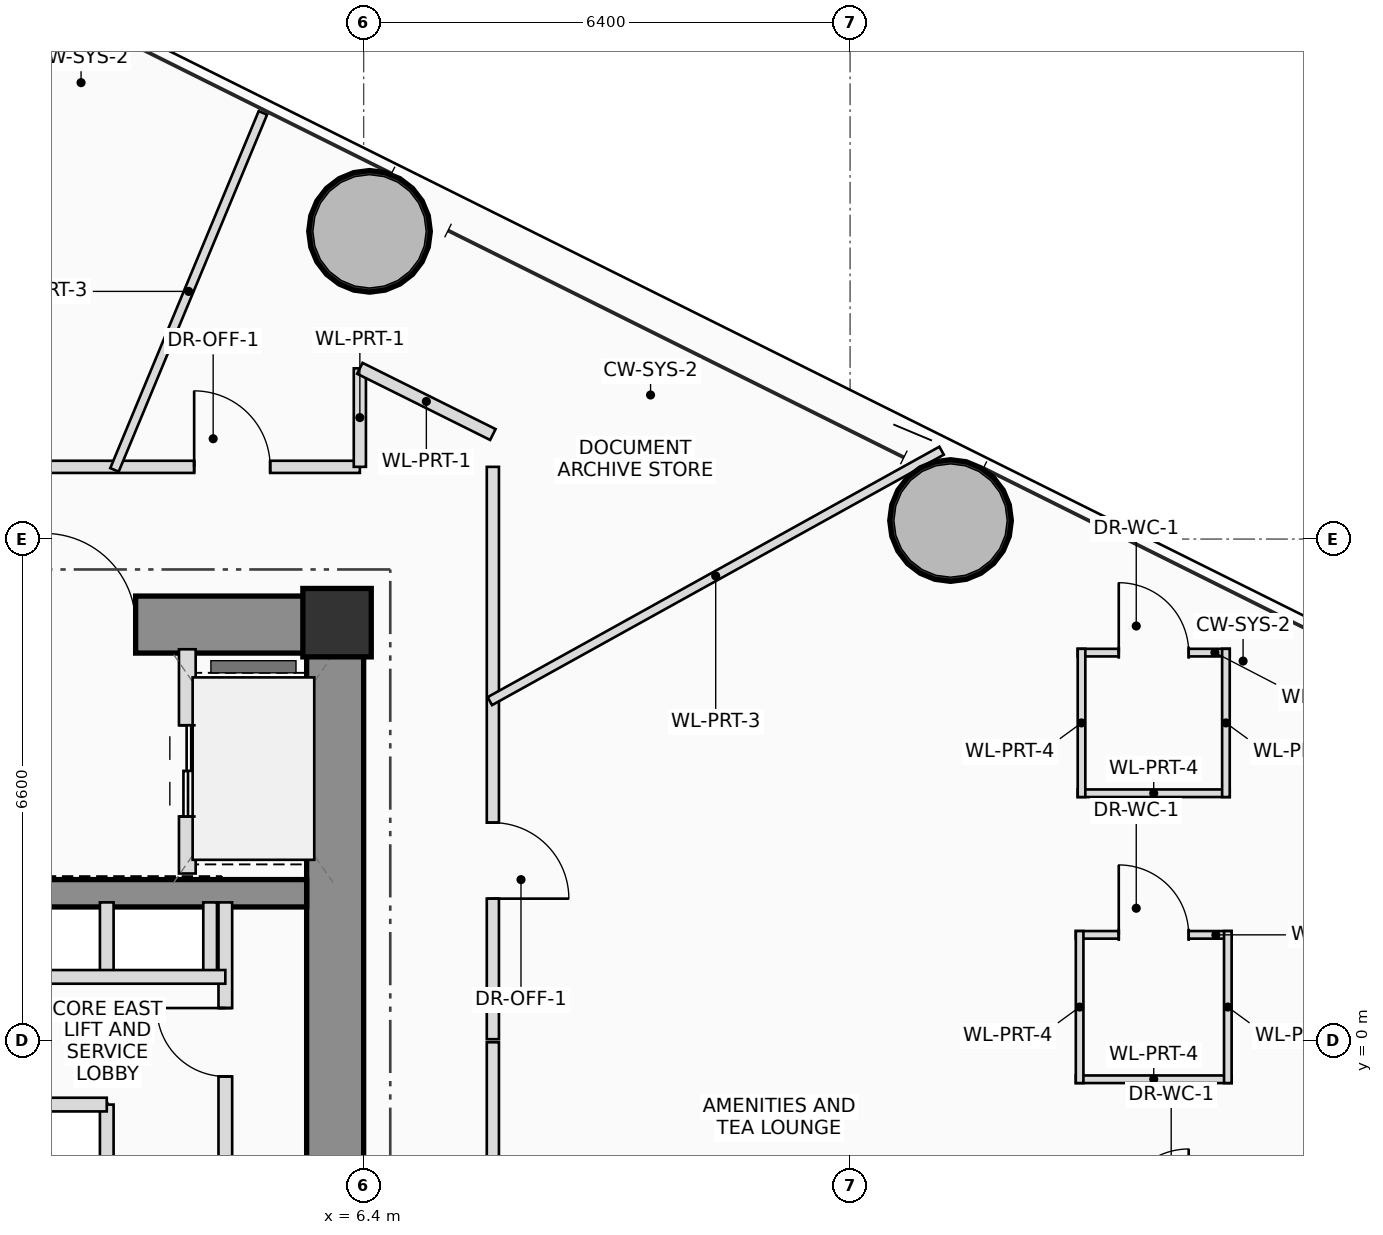
"""IFC4 building model, lengths in metres.
Left out: names, types, materials, properties, quantities, classifications, styles, units other than length and angle.
Written with IfcOpenShell. Run it as: python <this file> out.ifc"""

import sys

from ifc_helpers import new_model, si_unit, direction, frame, frame_2d, origin, origin_2d, place, context, subcontext, project, spatial, rectangle, hollow_circle, extrude, source, transform, mapped, element, fill, save


model = new_model("IFC4")
c1 = context("Model", 3, precision=1e-05, world=origin(), true_north=direction((0.0, 1.0)))
c2 = subcontext(c1, "Body", "Model", "MODEL_VIEW")
j1 = project(units=[si_unit("LENGTHUNIT", "METRE"), si_unit("PLANEANGLEUNIT", "RADIAN")], contexts=[c1])
p1 = place(None, origin())
s1 = spatial("IfcSite", under=j1, at=p1, CompositionType="ELEMENT")
p2 = place(p1, origin())
s2 = spatial("IfcBuilding", under=s1, at=p2, CompositionType="ELEMENT")
p3 = place(p2, frame((0.0, 0.0, 38.6)))
s3 = spatial("IfcBuildingStorey", under=s2, at=p3, CompositionType="ELEMENT", Elevation=38.6)
m1 = source(origin(), c2, "Body", "SweptSolid", [
    extrude(rectangle(XDim=0.9, YDim=0.9, at=origin_2d()), origin(), (0.0, 0.0, 1.0), 3.7),
])
p4 = place(p3, frame((6.05, 5.5, 0.0), z_axis=(0.0, 0.0, 1.0), x_axis=(1.0, 0.0, 0.0)))
e1 = element("IfcColumn", 1, at=p4, inside=s3, PredefinedType="COLUMN", context=c2, shape_type="MappedRepresentation", body=[
    mapped(m1, transform((0.0, 0.0, 0.0), scale=1.0)),
])
p5 = place(p3, frame((-6.4, 5.475, 0.0), z_axis=(0.0, 0.0, 1.0), x_axis=(1.0, 0.0, 0.0)))
e2 = element("IfcWall", 2, at=p5, inside=s3, PredefinedType="SHEAR", context=c2, shape_type="SweptSolid", body=[
    extrude(rectangle(XDim=12.8, YDim=0.75, at=frame_2d((6.4, 0.0))), origin(), (0.0, 0.0, 1.0), 3.7),
])
p6 = place(p5, frame((8.6, 0.0, 0.0)))
e3 = element("IfcOpeningElement", 3, at=p6, cuts=e2, PredefinedType="OPENING", context=c2, shape_type="SweptSolid", body=[
    extrude(rectangle(XDim=1.2, YDim=2.2, at=frame_2d((0.6, 1.1))), frame((0.0, 0.385, 0.0), z_axis=(0.0, -1.0, 0.0), x_axis=(1.0, 0.0, 0.0)), (0.0, 0.0, 1.0), 0.77),
])
p7 = place(p3, frame((6.025, -5.1, 0.0), z_axis=(0.0, 0.0, 1.0), x_axis=(0.0, 1.0, 0.0)))
e4 = element("IfcWall", 4, at=p7, inside=s3, PredefinedType="SHEAR", context=c2, shape_type="SweptSolid", body=[
    extrude(rectangle(XDim=10.2, YDim=0.75, at=frame_2d((5.1, 0.0))), origin(), (0.0, 0.0, 1.0), 3.7),
])
p8 = place(p3, frame((-5.65, 1.94, 0.0), z_axis=(0.0, 0.0, 1.0), x_axis=(1.0, 0.0, 0.0)))
e5 = element("IfcWall", 5, at=p8, inside=s3, PredefinedType="SHEAR", context=c2, shape_type="SweptSolid", body=[
    extrude(rectangle(XDim=11.3, YDim=0.36, at=frame_2d((5.65, 0.0))), origin(), (0.0, 0.0, 1.0), 3.7),
])
m2 = source(origin(), c2, "Body", "SweptSolid", [
    extrude(hollow_circle(Radius=0.8, WallThickness=0.055, at=origin_2d()), origin(), (0.0, 0.0, 1.0), 3.7),
])
for number, where, z_axis, x_axis in (
    (6, (14.122, 6.844, 0.0), (0.0, 0.0, 1.0), (1.0, 0.0, 0.0)),
    (7, (6.477, 10.648, 0.0), (0.0, 0.0, 1.0), (1.0, 0.0, 0.0)),
):
    element("IfcColumn", number, at=place(p3, frame(where, z_axis=z_axis, x_axis=x_axis)), inside=s3, PredefinedType="COLUMN", context=c2, shape_type="MappedRepresentation", body=[
        mapped(m2, transform((0.0, 0.0, 0.0), scale=1.0)),
    ])
p9 = place(p3, frame((4.08, 2.2, 0.0), z_axis=(0.0, 0.0, 1.0), x_axis=(0.0, 1.0, 0.0)))
e8 = element("IfcWall", 8, at=p9, inside=s3, PredefinedType="PLUMBINGWALL", context=c2, shape_type="SweptSolid", body=[
    extrude(rectangle(XDim=2.95, YDim=0.22, at=frame_2d((1.475, 0.0))), origin(), (0.0, 0.0, 1.0), 3.495),
])
p10 = place(p9, frame((0.75, 0.0, 0.0)))
e9 = element("IfcOpeningElement", 9, at=p10, cuts=e8, PredefinedType="OPENING", context=c2, shape_type="SweptSolid", body=[
    extrude(rectangle(XDim=1.2, YDim=2.25, at=frame_2d((0.6, 1.125))), frame((0.0, 0.12, 0.0), z_axis=(0.0, -1.0, 0.0), x_axis=(1.0, 0.0, 0.0)), (0.0, 0.0, 1.0), 0.24),
])
for number, where, z_axis, x_axis in (
    (10, (3.02, 0.84, 0.0), (0.0, 0.0, 1.0), (0.0, 1.0, 0.0)),
    (11, (4.38, 0.84, 0.0), (0.0, 0.0, 1.0), (0.0, 1.0, 0.0)),
    (12, (3.02, -1.82, 0.0), (0.0, 0.0, 1.0), (0.0, 1.0, 0.0)),
):
    element("IfcWall", number, at=place(p3, frame(where, z_axis=z_axis, x_axis=x_axis)), inside=s3, PredefinedType="PLUMBINGWALL", context=c2, shape_type="SweptSolid", body=[
        extrude(rectangle(XDim=0.98, YDim=0.18, at=frame_2d((0.49, 0.0))), origin(), (0.0, 0.0, 1.0), 3.495),
    ])
p11 = place(p3, frame((4.58, -1.82, 0.0), z_axis=(0.0, 0.0, 1.0), x_axis=(0.0, 1.0, 0.0)))
e13 = element("IfcWall", 13, at=p11, inside=s3, PredefinedType="PLUMBINGWALL", context=c2, shape_type="SweptSolid", body=[
    extrude(rectangle(XDim=3.64, YDim=0.18, at=frame_2d((1.82, 0.0))), origin(), (0.0, 0.0, 1.0), 3.495),
])
p12 = place(p11, frame((1.35, 0.0, 0.0)))
e14 = element("IfcOpeningElement", 14, at=p12, cuts=e13, PredefinedType="OPENING", context=c2, shape_type="SweptSolid", body=[
    extrude(rectangle(XDim=0.9, YDim=2.05, at=frame_2d((0.45, 1.025))), frame((0.0, 0.1, 0.0), z_axis=(0.0, -1.0, 0.0), x_axis=(1.0, 0.0, 0.0)), (0.0, 0.0, 1.0), 0.2),
])
p13 = place(p3, frame((-5.68, 0.84, 0.0), z_axis=(0.0, 0.0, 1.0), x_axis=(1.0, 0.0, 0.0)))
e15 = element("IfcWall", 15, at=p13, inside=s3, PredefinedType="PLUMBINGWALL", context=c2, shape_type="SweptSolid", body=[
    extrude(rectangle(XDim=10.26, YDim=0.18, at=frame_2d((5.13, 0.0))), origin(), (0.0, 0.0, 1.0), 3.495),
])
p14 = place(p13, frame((0.43, 0.0, 0.0)))
e16 = element("IfcOpeningElement", 16, at=p14, cuts=e15, PredefinedType="OPENING", context=c2, shape_type="SweptSolid", body=[
    extrude(rectangle(XDim=1.1, YDim=2.2, at=frame_2d((0.55, 1.1))), frame((0.0, 0.1, 0.0), z_axis=(0.0, -1.0, 0.0), x_axis=(1.0, 0.0, 0.0)), (0.0, 0.0, 1.0), 0.2),
])
p15 = place(p13, frame((2.13, 0.0, 0.0)))
e17 = element("IfcOpeningElement", 17, at=p15, cuts=e15, PredefinedType="OPENING", context=c2, shape_type="SweptSolid", body=[
    extrude(rectangle(XDim=1.1, YDim=2.2, at=frame_2d((0.55, 1.1))), frame((0.0, 0.1, 0.0), z_axis=(0.0, -1.0, 0.0), x_axis=(1.0, 0.0, 0.0)), (0.0, 0.0, 1.0), 0.2),
])
p16 = place(p3, frame((-5.68, -0.84, 0.0), z_axis=(0.0, 0.0, 1.0), x_axis=(1.0, 0.0, 0.0)))
e18 = element("IfcWall", 18, at=p16, inside=s3, PredefinedType="PLUMBINGWALL", context=c2, shape_type="SweptSolid", body=[
    extrude(rectangle(XDim=8.7, YDim=0.18, at=frame_2d((4.35, 0.0))), origin(), (0.0, 0.0, 1.0), 3.495),
])
p17 = place(p16, frame((0.43, 0.0, 0.0)))
e19 = element("IfcOpeningElement", 19, at=p17, cuts=e18, PredefinedType="OPENING", context=c2, shape_type="SweptSolid", body=[
    extrude(rectangle(XDim=1.1, YDim=2.2, at=frame_2d((0.55, 1.1))), frame((0.0, 0.1, 0.0), z_axis=(0.0, -1.0, 0.0), x_axis=(1.0, 0.0, 0.0)), (0.0, 0.0, 1.0), 0.2),
])
p18 = place(p16, frame((2.13, 0.0, 0.0)))
e20 = element("IfcOpeningElement", 20, at=p18, cuts=e18, PredefinedType="OPENING", context=c2, shape_type="SweptSolid", body=[
    extrude(rectangle(XDim=1.1, YDim=2.2, at=frame_2d((0.55, 1.1))), frame((0.0, 0.1, 0.0), z_axis=(0.0, -1.0, 0.0), x_axis=(1.0, 0.0, 0.0)), (0.0, 0.0, 1.0), 0.2),
])
p19 = place(p3, frame((15.77, 1.393, 0.0), z_axis=(0.0, 0.0, 1.0), x_axis=(1.0, 0.0, 0.0)))
e21 = element("IfcWall", 21, at=p19, inside=s3, PredefinedType="PARTITIONING", context=c2, shape_type="SweptSolid", body=[
    extrude(rectangle(XDim=2.05, YDim=0.1, at=frame_2d((1.025, 0.0))), origin(), (0.0, 0.0, 1.0), 3.15),
])
p20 = place(p19, frame((0.565, 0.0, 0.0)))
e22 = element("IfcOpeningElement", 22, at=p20, cuts=e21, PredefinedType="OPENING", context=c2, shape_type="SweptSolid", body=[
    extrude(rectangle(XDim=0.92, YDim=2.1, at=frame_2d((0.46, 1.05))), frame((0.0, 0.06, 0.0), z_axis=(0.0, -1.0, 0.0), x_axis=(1.0, 0.0, 0.0)), (0.0, 0.0, 1.0), 0.12),
])
p21 = place(p3, frame((17.82, -0.507, 0.0), z_axis=(0.0, 0.0, 1.0), x_axis=(-1.0, 0.0, 0.0)))
e23 = element("IfcWall", 23, at=p21, inside=s3, PredefinedType="PARTITIONING", context=c2, shape_type="SweptSolid", body=[
    extrude(rectangle(XDim=2.05, YDim=0.1, at=frame_2d((1.025, 0.0))), origin(), (0.0, 0.0, 1.0), 3.15),
])
p22 = place(p3, frame((17.77, 1.443, 0.0), z_axis=(0.0, 0.0, 1.0), x_axis=(0.0, -1.0, 0.0)))
e24 = element("IfcWall", 24, at=p22, inside=s3, PredefinedType="PARTITIONING", context=c2, shape_type="SweptSolid", body=[
    extrude(rectangle(XDim=2.0, YDim=0.1, at=frame_2d((1.0, 0.0))), origin(), (0.0, 0.0, 1.0), 3.15),
])
p23 = place(p3, frame((15.82, -0.557, 0.0), z_axis=(0.0, 0.0, 1.0), x_axis=(0.0, 1.0, 0.0)))
e25 = element("IfcWall", 25, at=p23, inside=s3, PredefinedType="PARTITIONING", context=c2, shape_type="SweptSolid", body=[
    extrude(rectangle(XDim=2.0, YDim=0.1, at=frame_2d((1.0, 0.0))), origin(), (0.0, 0.0, 1.0), 3.495),
])
p24 = place(p3, frame((15.795, 5.106, 0.0), z_axis=(0.0, 0.0, 1.0), x_axis=(1.0, 0.0, 0.0)))
e26 = element("IfcWall", 26, at=p24, inside=s3, PredefinedType="PARTITIONING", context=c2, shape_type="SweptSolid", body=[
    extrude(rectangle(XDim=2.0, YDim=0.1, at=frame_2d((1.0, 0.0))), origin(), (0.0, 0.0, 1.0), 2.96),
])
p25 = place(p24, frame((0.54, 0.0, 0.0)))
e27 = element("IfcOpeningElement", 27, at=p25, cuts=e26, PredefinedType="OPENING", context=c2, shape_type="SweptSolid", body=[
    extrude(rectangle(XDim=0.92, YDim=2.1, at=frame_2d((0.46, 1.05))), frame((0.0, 0.06, 0.0), z_axis=(0.0, -1.0, 0.0), x_axis=(1.0, 0.0, 0.0)), (0.0, 0.0, 1.0), 0.12),
])
p26 = place(p3, frame((17.795, 3.256, 0.0), z_axis=(0.0, 0.0, 1.0), x_axis=(-1.0, 0.0, 0.0)))
e28 = element("IfcWall", 28, at=p26, inside=s3, PredefinedType="PARTITIONING", context=c2, shape_type="SweptSolid", body=[
    extrude(rectangle(XDim=2.0, YDim=0.1, at=frame_2d((1.0, 0.0))), origin(), (0.0, 0.0, 1.0), 3.15),
])
for number, where, z_axis, x_axis in (
    (29, (17.745, 5.156, 0.0), (0.0, 0.0, 1.0), (0.0, -1.0, 0.0)),
    (30, (15.845, 3.206, 0.0), (0.0, 0.0, 1.0), (0.0, 1.0, 0.0)),
):
    element("IfcWall", number, at=place(p3, frame(where, z_axis=z_axis, x_axis=x_axis)), inside=s3, PredefinedType="PARTITIONING", context=c2, shape_type="SweptSolid", body=[
        extrude(rectangle(XDim=1.95, YDim=0.1, at=frame_2d((0.975, 0.0))), origin(), (0.0, 0.0, 1.0), 2.8),
    ])
p27 = place(p3, frame((-6.35, 7.55, 0.0), z_axis=(0.0, 0.0, 1.0), x_axis=(1.0, 0.0, 0.0)))
e31 = element("IfcWall", 31, at=p27, inside=s3, PredefinedType="PARTITIONING", context=c2, shape_type="SweptSolid", body=[
    extrude(rectangle(XDim=12.7, YDim=0.16, at=frame_2d((6.35, 0.0))), origin(), (0.0, 0.0, 1.0), 2.8),
])
p28 = place(p27, frame((10.52, 0.0, 0.0)))
e32 = element("IfcOpeningElement", 32, at=p28, cuts=e31, PredefinedType="OPENING", context=c2, shape_type="SweptSolid", body=[
    extrude(rectangle(XDim=1.0, YDim=2.25, at=frame_2d((0.5, 1.125))), frame((0.0, 0.09, 0.0), z_axis=(0.0, -1.0, 0.0), x_axis=(1.0, 0.0, 0.0)), (0.0, 0.0, 1.0), 0.18),
])
p29 = place(p3, frame((6.35, 7.55, 0.0), z_axis=(0.0, 0.0, 1.0), x_axis=(0.0, 1.0, 0.0)))
e33 = element("IfcWall", 33, at=p29, inside=s3, PredefinedType="PARTITIONING", context=c2, shape_type="SweptSolid", body=[
    extrude(rectangle(XDim=1.296, YDim=0.16, at=frame_2d((0.648, 0.0))), origin(), (0.0, 0.0, 1.0), 2.8),
])
p30 = place(p3, frame((6.35, 8.846, 0.0), z_axis=(0.0, 0.0, 1.0), x_axis=(0.89527489017, -0.445514164793, 0.0)))
e34 = element("IfcWall", 34, at=p30, inside=s3, PredefinedType="PARTITIONING", context=c2, shape_type="SweptSolid", body=[
    extrude(rectangle(XDim=1.955, YDim=0.16, at=frame_2d((0.977, 0.0))), origin(), (0.0, 0.0, 1.0), 2.8),
])
p31 = place(p3, frame((8.1, 7.55, 0.0), z_axis=(0.0, 0.0, 1.0), x_axis=(0.0, -1.0, 0.0)))
e35 = element("IfcWall", 35, at=p31, inside=s3, PredefinedType="PARTITIONING", context=c2, shape_type="SweptSolid", body=[
    extrude(rectangle(XDim=7.53, YDim=0.16, at=frame_2d((3.765, 0.0))), origin(), (0.0, 0.0, 1.0), 2.8),
])
p32 = place(p31, frame((4.681, 0.0, 0.0)))
e36 = element("IfcOpeningElement", 36, at=p32, cuts=e35, PredefinedType="OPENING", context=c2, shape_type="SweptSolid", body=[
    extrude(rectangle(XDim=1.0, YDim=2.25, at=frame_2d((0.5, 1.125))), frame((0.0, 0.09, 0.0), z_axis=(0.0, -1.0, 0.0), x_axis=(1.0, 0.0, 0.0)), (0.0, 0.0, 1.0), 0.18),
])
p33 = place(p3, frame((8.1, -0.02, 0.0), z_axis=(0.0, 0.0, 1.0), x_axis=(0.0, -1.0, 0.0)))
e37 = element("IfcWall", 37, at=p33, inside=s3, PredefinedType="PARTITIONING", context=c2, shape_type="SweptSolid", body=[
    extrude(rectangle(XDim=7.53, YDim=0.16, at=frame_2d((3.765, 0.0))), origin(), (0.0, 0.0, 1.0), 2.8),
])
p34 = place(p3, frame((8.06, 4.468, 0.0), z_axis=(0.0, 0.0, 1.0), x_axis=(0.874622878111, 0.484803899618, 0.0)))
e38 = element("IfcWall", 38, at=p34, inside=s3, PredefinedType="PARTITIONING", context=c2, shape_type="SweptSolid", body=[
    extrude(rectangle(XDim=6.796, YDim=0.12, at=frame_2d((3.398, 0.0))), origin(), (0.0, 0.0, 1.0), 2.8),
])
p35 = place(p3, frame((3.122, 7.51, 0.0), z_axis=(0.0, 0.0, 1.0), x_axis=(0.383885926118, 0.923380525963, 0.0)))
e39 = element("IfcWall", 39, at=p35, inside=s3, PredefinedType="PARTITIONING", context=c2, shape_type="SweptSolid", body=[
    extrude(rectangle(XDim=5.086, YDim=0.12, at=frame_2d((2.543, 0.0))), origin(), (0.0, 0.0, 1.0), 2.96),
])
p36 = place(p6, origin())
e40 = element("IfcDoor", 40, at=p36, inside=s3, OperationType="SINGLE_SWING_LEFT", PredefinedType="DOOR", context=c2, shape_type="SweptSolid", body=[
    extrude(rectangle(XDim=1.2, YDim=2.2, at=frame_2d((0.6, 1.1))), frame((0.0, 0.025, 0.0), z_axis=(0.0, -1.0, 0.0), x_axis=(1.0, 0.0, 0.0)), (0.0, 0.0, 1.0), 0.05),
])
fill(e3, e40)
p37 = place(p10, origin())
e41 = element("IfcDoor", 41, at=p37, inside=s3, OperationType="DOUBLE_DOOR_SLIDING", PredefinedType="DOOR", context=c2, shape_type="SweptSolid", body=[
    extrude(rectangle(XDim=1.2, YDim=2.25, at=frame_2d((0.6, 1.125))), frame((0.0, 0.025, 0.0), z_axis=(0.0, -1.0, 0.0), x_axis=(1.0, 0.0, 0.0)), (0.0, 0.0, 1.0), 0.05),
])
fill(e9, e41)
p38 = place(p12, origin())
e42 = element("IfcDoor", 42, at=p38, inside=s3, OperationType="SINGLE_SWING_RIGHT", PredefinedType="DOOR", context=c2, shape_type="SweptSolid", body=[
    extrude(rectangle(XDim=0.9, YDim=2.05, at=frame_2d((0.45, 1.025))), frame((0.0, 0.025, 0.0), z_axis=(0.0, -1.0, 0.0), x_axis=(1.0, 0.0, 0.0)), (0.0, 0.0, 1.0), 0.05),
])
fill(e14, e42)
p39 = place(p20, origin())
e43 = element("IfcDoor", 43, at=p39, inside=s3, OperationType="SINGLE_SWING_LEFT", PredefinedType="DOOR", context=c2, shape_type="SweptSolid", body=[
    extrude(rectangle(XDim=0.92, YDim=2.1, at=frame_2d((0.46, 1.05))), frame((0.0, 0.025, 0.0), z_axis=(0.0, -1.0, 0.0), x_axis=(1.0, 0.0, 0.0)), (0.0, 0.0, 1.0), 0.05),
])
fill(e22, e43)
p40 = place(p25, origin())
e44 = element("IfcDoor", 44, at=p40, inside=s3, OperationType="SINGLE_SWING_LEFT", PredefinedType="DOOR", context=c2, shape_type="SweptSolid", body=[
    extrude(rectangle(XDim=0.92, YDim=2.1, at=frame_2d((0.46, 1.05))), frame((0.0, 0.025, 0.0), z_axis=(0.0, -1.0, 0.0), x_axis=(1.0, 0.0, 0.0)), (0.0, 0.0, 1.0), 0.05),
])
fill(e27, e44)
p41 = place(p28, origin())
e45 = element("IfcDoor", 45, at=p41, inside=s3, OperationType="SINGLE_SWING_LEFT", PredefinedType="DOOR", context=c2, shape_type="SweptSolid", body=[
    extrude(rectangle(XDim=1.0, YDim=2.25, at=frame_2d((0.5, 1.125))), frame((0.0, 0.025, 0.0), z_axis=(0.0, -1.0, 0.0), x_axis=(1.0, 0.0, 0.0)), (0.0, 0.0, 1.0), 0.05),
])
fill(e32, e45)
p42 = place(p32, origin())
e46 = element("IfcDoor", 46, at=p42, inside=s3, OperationType="SINGLE_SWING_RIGHT", PredefinedType="DOOR", context=c2, shape_type="SweptSolid", body=[
    extrude(rectangle(XDim=1.0, YDim=2.25, at=frame_2d((0.5, 1.125))), frame((0.0, 0.025, 0.0), z_axis=(0.0, -1.0, 0.0), x_axis=(1.0, 0.0, 0.0)), (0.0, 0.0, 1.0), 0.05),
])
fill(e36, e46)
save(model, sys.argv[1])
